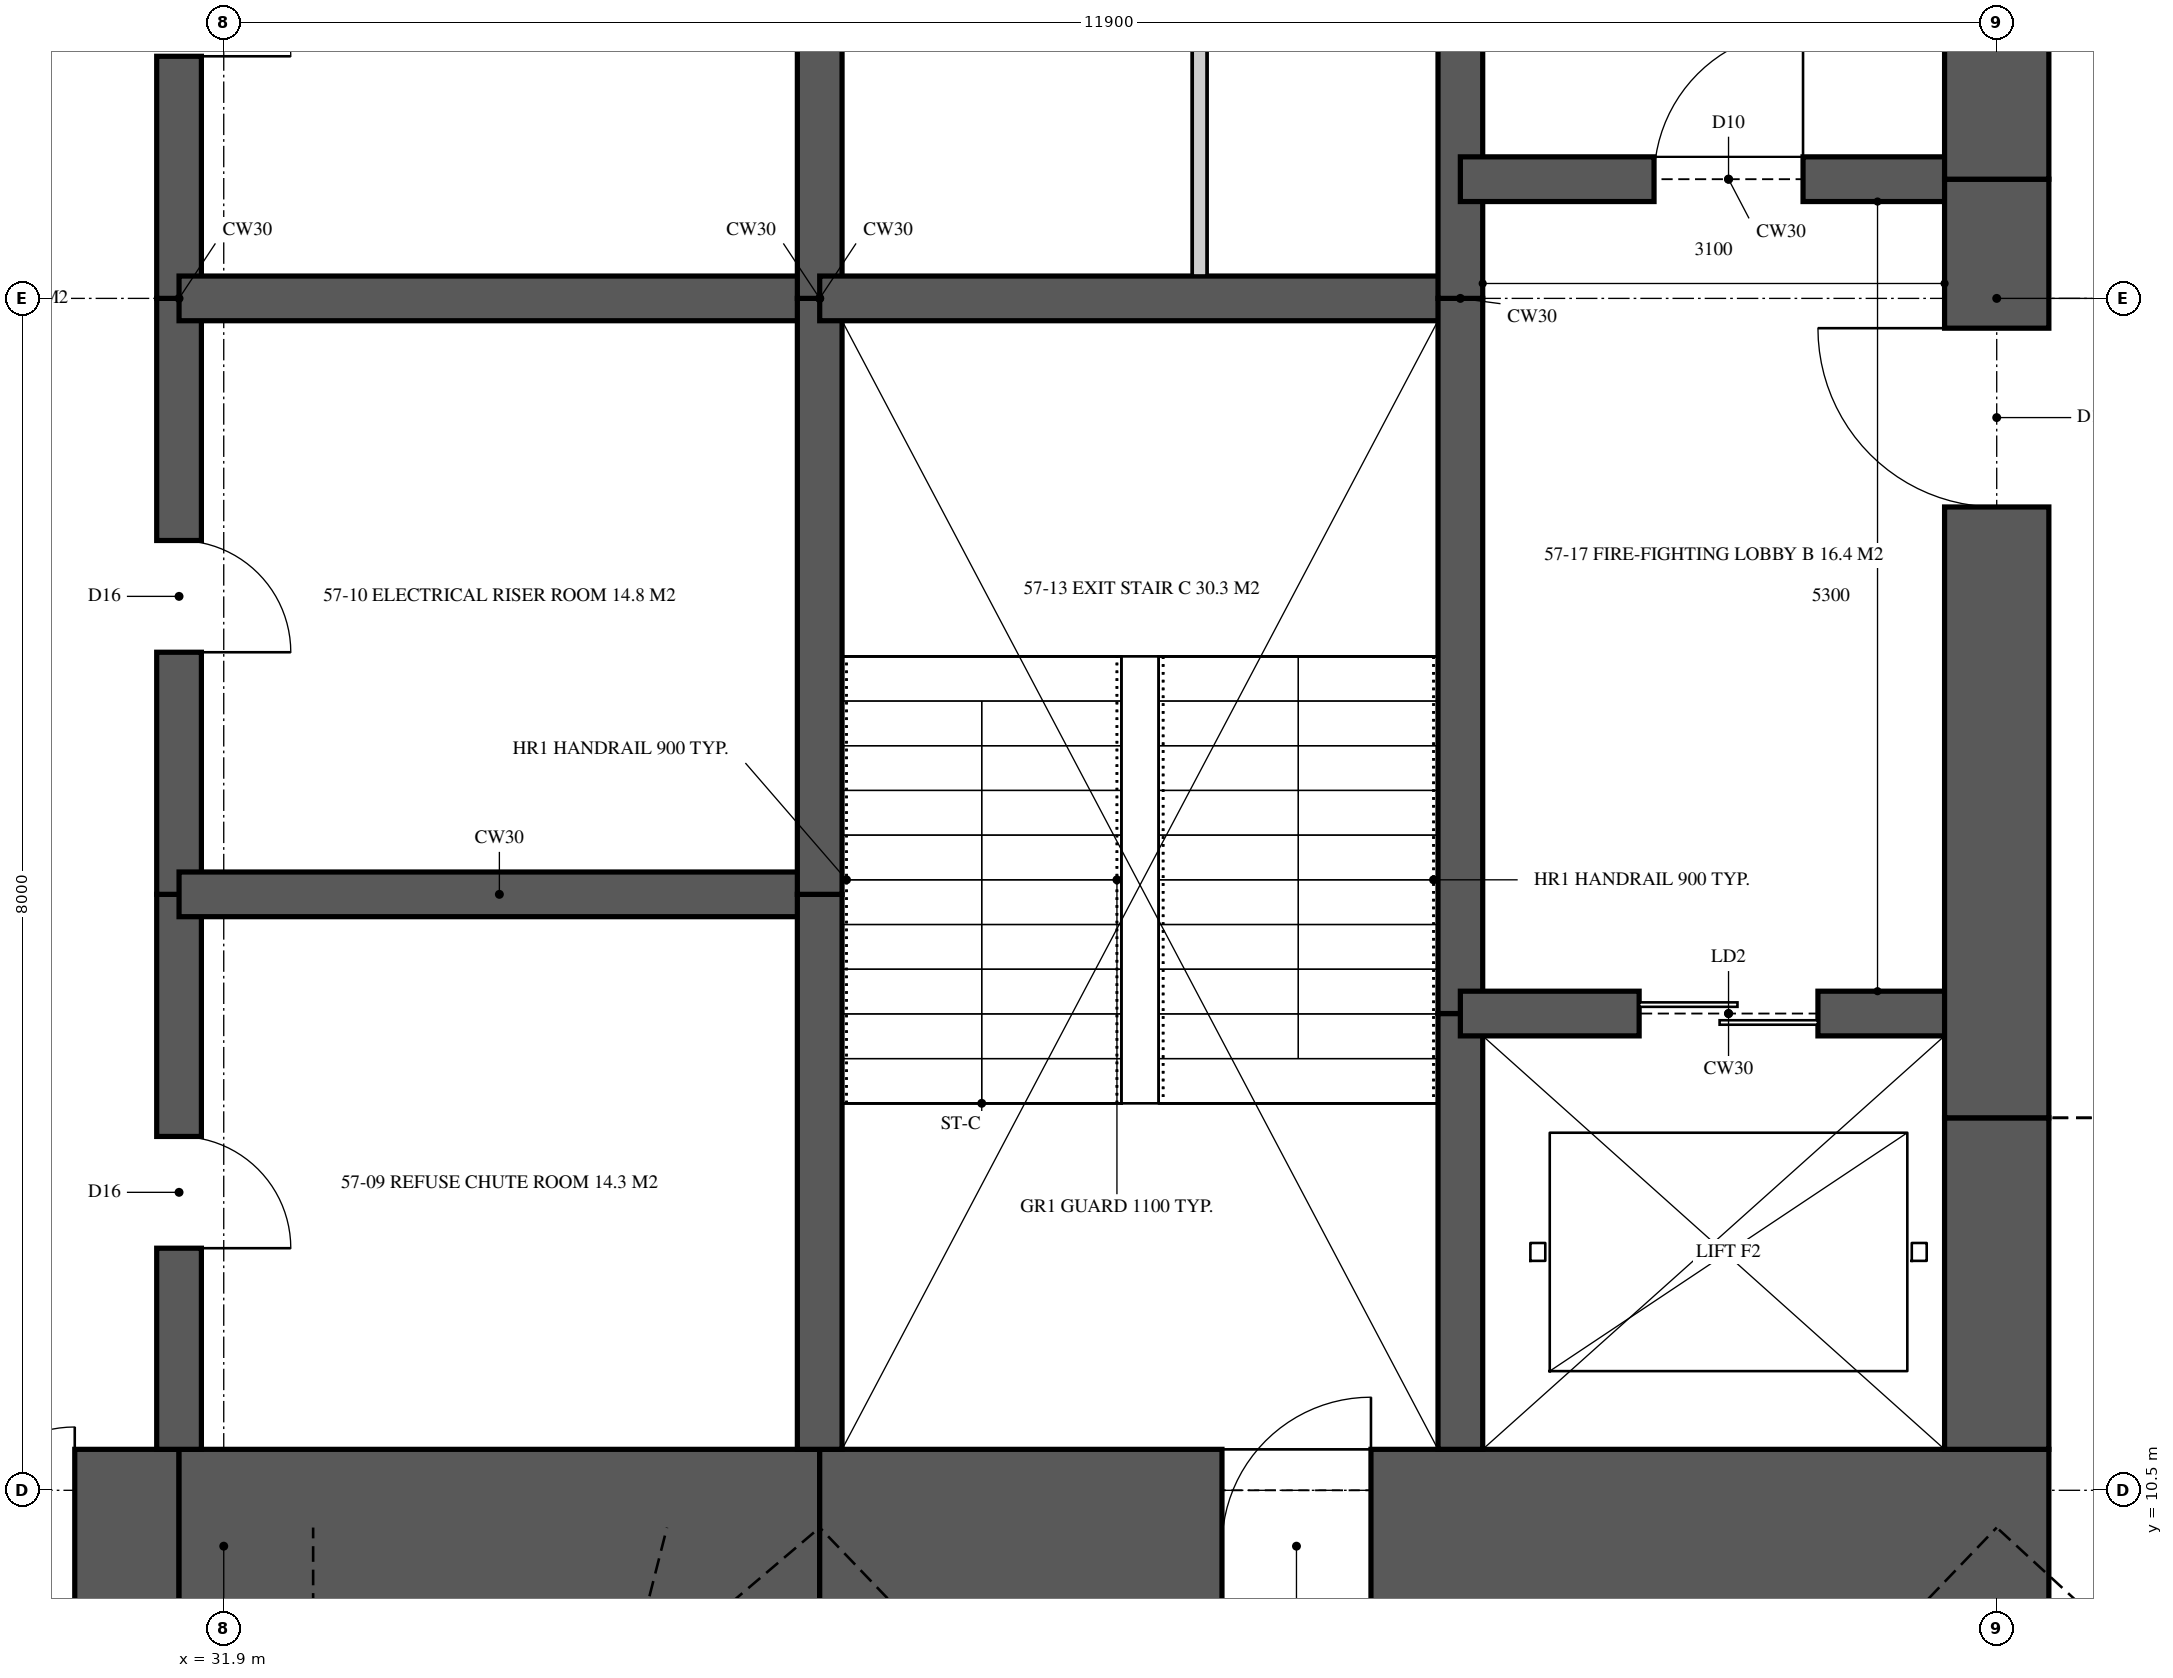
"""IFC4 building model, lengths in metres.
Left out: names, types, materials, properties, quantities, classifications, styles, units other than length and angle.
Written with IfcOpenShell. Run it as: python <this file> out.ifc"""

import sys

from ifc_helpers import new_model, si_unit, direction, frame, frame_2d, origin, place, context, subcontext, project, spatial, rectangle, extrude, element, fill, save


model = new_model("IFC4")
c1 = context("Model", 3, precision=1e-05, world=origin(), true_north=direction((0.0, 1.0)))
c2 = subcontext(c1, "Body", "Model", "MODEL_VIEW")
j1 = project(units=[si_unit("LENGTHUNIT", "METRE"), si_unit("PLANEANGLEUNIT", "RADIAN")], contexts=[c1])
p1 = place(None, origin())
s1 = spatial("IfcSite", under=j1, at=p1, CompositionType="ELEMENT")
p2 = place(p1, origin())
s2 = spatial("IfcBuilding", under=s1, at=p2, CompositionType="ELEMENT")
p3 = place(p2, frame((0.0, 0.0, 207.95)))
s3 = spatial("IfcBuildingStorey", under=s2, at=p3, CompositionType="ELEMENT", Elevation=207.95)
p4 = place(p3, frame((26.0, 10.125, 0.0), z_axis=(0.0, 0.0, 1.0), x_axis=(1.0, 0.0, 0.0)))
e1 = element("IfcWall", 1, at=p4, inside=s3, PredefinedType="SHEAR", context=c2, shape_type="SweptSolid", body=[
    extrude(rectangle(XDim=5.6, YDim=1.3, at=frame_2d((2.8, 0.0))), origin(), (0.0, 0.0, 1.0), 5.0),
])
p5 = place(p4, frame((3.3, 0.0, 0.0)))
e2 = element("IfcOpeningElement", 2, at=p5, cuts=e1, PredefinedType="OPENING", context=c2, shape_type="SweptSolid", body=[
    extrude(rectangle(XDim=1.6, YDim=2.1, at=frame_2d((0.8, 1.05))), frame((0.0, 0.66, 0.0), z_axis=(0.0, -1.0, 0.0), x_axis=(1.0, 0.0, 0.0)), (0.0, 0.0, 1.0), 1.32),
])
p6 = place(p3, frame((31.6, 10.125, 0.0), z_axis=(0.0, 0.0, 1.0), x_axis=(1.0, 0.0, 0.0)))
e3 = element("IfcWall", 3, at=p6, inside=s3, PredefinedType="SHEAR", context=c2, shape_type="SweptSolid", body=[
    extrude(rectangle(XDim=4.3, YDim=1.3, at=frame_2d((2.15, 0.0))), origin(), (0.0, 0.0, 1.0), 5.0),
])
p7 = place(p3, frame((35.9, 10.125, 0.0), z_axis=(0.0, 0.0, 1.0), x_axis=(1.0, 0.0, 0.0)))
e4 = element("IfcWall", 4, at=p7, inside=s3, PredefinedType="SHEAR", context=c2, shape_type="SweptSolid", body=[
    extrude(rectangle(XDim=8.25, YDim=1.3, at=frame_2d((4.125, 0.0))), origin(), (0.0, 0.0, 1.0), 5.0),
])
p8 = place(p7, frame((2.7, 0.0, 0.0)))
e5 = element("IfcOpeningElement", 5, at=p8, cuts=e4, PredefinedType="OPENING", context=c2, shape_type="SweptSolid", body=[
    extrude(rectangle(XDim=1.0, YDim=2.1, at=frame_2d((0.5, 1.05))), frame((0.0, 0.66, 0.0), z_axis=(0.0, -1.0, 0.0), x_axis=(1.0, 0.0, 0.0)), (0.0, 0.0, 1.0), 1.32),
])
p9 = place(p3, frame((43.8, 10.775, 0.0), z_axis=(0.0, 0.0, 1.0), x_axis=(0.0, 1.0, 0.0)))
e6 = element("IfcWall", 6, at=p9, inside=s3, PredefinedType="SHEAR", context=c2, shape_type="SweptSolid", body=[
    extrude(rectangle(XDim=2.225, YDim=0.7, at=frame_2d((1.113, 0.0))), origin(), (0.0, 0.0, 1.0), 5.0),
])
p10 = place(p3, frame((43.8, 13.0, 0.0), z_axis=(0.0, 0.0, 1.0), x_axis=(0.0, 1.0, 0.0)))
e7 = element("IfcWall", 7, at=p10, inside=s3, PredefinedType="SHEAR", context=c2, shape_type="SweptSolid", body=[
    extrude(rectangle(XDim=6.3, YDim=0.7, at=frame_2d((3.15, 0.0))), origin(), (0.0, 0.0, 1.0), 5.0),
])
p11 = place(p10, frame((4.1, 0.0, 0.0)))
e8 = element("IfcOpeningElement", 8, at=p11, cuts=e7, PredefinedType="OPENING", context=c2, shape_type="SweptSolid", body=[
    extrude(rectangle(XDim=1.2, YDim=2.2, at=frame_2d((0.6, 1.1))), frame((0.0, 0.36, 0.0), z_axis=(0.0, -1.0, 0.0), x_axis=(1.0, 0.0, 0.0)), (0.0, 0.0, 1.0), 0.72),
])
p12 = place(p3, frame((43.8, 19.3, 0.0), z_axis=(0.0, 0.0, 1.0), x_axis=(0.0, 1.0, 0.0)))
e9 = element("IfcWall", 9, at=p12, inside=s3, PredefinedType="SHEAR", context=c2, shape_type="SweptSolid", body=[
    extrude(rectangle(XDim=6.925, YDim=0.7, at=frame_2d((3.462, 0.0))), origin(), (0.0, 0.0, 1.0), 5.0),
])
p13 = place(p3, frame((31.6, 10.775, 0.0), z_axis=(0.0, 0.0, 1.0), x_axis=(0.0, 1.0, 0.0)))
e10 = element("IfcWall", 10, at=p13, inside=s3, PredefinedType="SHEAR", context=c2, shape_type="SweptSolid", body=[
    extrude(rectangle(XDim=3.725, YDim=0.3, at=frame_2d((1.863, 0.0))), origin(), (0.0, 0.0, 1.0), 5.0),
])
p14 = place(p13, frame((1.35, 0.0, 0.0)))
e11 = element("IfcOpeningElement", 11, at=p14, cuts=e10, PredefinedType="OPENING", context=c2, shape_type="SweptSolid", body=[
    extrude(rectangle(XDim=0.75, YDim=2.1, at=frame_2d((0.375, 1.05))), frame((0.0, 0.16, 0.0), z_axis=(0.0, -1.0, 0.0), x_axis=(1.0, 0.0, 0.0)), (0.0, 0.0, 1.0), 0.32),
])
p15 = place(p3, frame((31.6, 14.5, 0.0), z_axis=(0.0, 0.0, 1.0), x_axis=(0.0, 1.0, 0.0)))
e12 = element("IfcWall", 12, at=p15, inside=s3, PredefinedType="SHEAR", context=c2, shape_type="SweptSolid", body=[
    extrude(rectangle(XDim=4.0, YDim=0.3, at=frame_2d((2.0, 0.0))), origin(), (0.0, 0.0, 1.0), 5.0),
])
p16 = place(p15, frame((1.625, 0.0, 0.0)))
e13 = element("IfcOpeningElement", 13, at=p16, cuts=e12, PredefinedType="OPENING", context=c2, shape_type="SweptSolid", body=[
    extrude(rectangle(XDim=0.75, YDim=2.1, at=frame_2d((0.375, 1.05))), frame((0.0, 0.16, 0.0), z_axis=(0.0, -1.0, 0.0), x_axis=(1.0, 0.0, 0.0)), (0.0, 0.0, 1.0), 0.32),
])
p17 = place(p3, frame((31.6, 18.5, 0.0), z_axis=(0.0, 0.0, 1.0), x_axis=(0.0, 1.0, 0.0)))
e14 = element("IfcWall", 14, at=p17, inside=s3, PredefinedType="SHEAR", context=c2, shape_type="SweptSolid", body=[
    extrude(rectangle(XDim=4.0, YDim=0.3, at=frame_2d((2.0, 0.0))), origin(), (0.0, 0.0, 1.0), 5.0),
])
p18 = place(p17, frame((1.625, 0.0, 0.0)))
e15 = element("IfcOpeningElement", 15, at=p18, cuts=e14, PredefinedType="OPENING", context=c2, shape_type="SweptSolid", body=[
    extrude(rectangle(XDim=0.75, YDim=2.1, at=frame_2d((0.375, 1.05))), frame((0.0, 0.16, 0.0), z_axis=(0.0, -1.0, 0.0), x_axis=(1.0, 0.0, 0.0)), (0.0, 0.0, 1.0), 0.32),
])
p19 = place(p3, frame((35.9, 10.775, 0.0), z_axis=(0.0, 0.0, 1.0), x_axis=(0.0, 1.0, 0.0)))
e16 = element("IfcWall", 16, at=p19, inside=s3, PredefinedType="SHEAR", context=c2, shape_type="SweptSolid", body=[
    extrude(rectangle(XDim=3.725, YDim=0.3, at=frame_2d((1.863, 0.0))), origin(), (0.0, 0.0, 1.0), 5.0),
])
for number, where, z_axis, x_axis in (
    (17, (35.9, 14.5, 0.0), (0.0, 0.0, 1.0), (0.0, 1.0, 0.0)),
    (18, (35.9, 18.5, 0.0), (0.0, 0.0, 1.0), (0.0, 1.0, 0.0)),
):
    element("IfcWall", number, at=place(p3, frame(where, z_axis=z_axis, x_axis=x_axis)), inside=s3, PredefinedType="SHEAR", context=c2, shape_type="SweptSolid", body=[
        extrude(rectangle(XDim=4.0, YDim=0.3, at=frame_2d((2.0, 0.0))), origin(), (0.0, 0.0, 1.0), 5.0),
    ])
p20 = place(p3, frame((40.2, 10.775, 0.0), z_axis=(0.0, 0.0, 1.0), x_axis=(0.0, 1.0, 0.0)))
e19 = element("IfcWall", 19, at=p20, inside=s3, PredefinedType="SHEAR", context=c2, shape_type="SweptSolid", body=[
    extrude(rectangle(XDim=2.925, YDim=0.3, at=frame_2d((1.462, 0.0))), origin(), (0.0, 0.0, 1.0), 5.0),
])
p21 = place(p3, frame((40.2, 13.7, 0.0), z_axis=(0.0, 0.0, 1.0), x_axis=(0.0, 1.0, 0.0)))
e20 = element("IfcWall", 20, at=p21, inside=s3, PredefinedType="SHEAR", context=c2, shape_type="SweptSolid", body=[
    extrude(rectangle(XDim=4.8, YDim=0.3, at=frame_2d((2.4, 0.0))), origin(), (0.0, 0.0, 1.0), 5.0),
])
p22 = place(p3, frame((40.2, 18.5, 0.0), z_axis=(0.0, 0.0, 1.0), x_axis=(0.0, 1.0, 0.0)))
e21 = element("IfcWall", 21, at=p22, inside=s3, PredefinedType="SHEAR", context=c2, shape_type="SweptSolid", body=[
    extrude(rectangle(XDim=7.725, YDim=0.3, at=frame_2d((3.863, 0.0))), origin(), (0.0, 0.0, 1.0), 5.0),
])
for number, where, z_axis, x_axis in (
    (22, (31.6, 14.5, 0.0), (0.0, 0.0, 1.0), (1.0, 0.0, 0.0)),
    (23, (31.6, 18.5, 0.0), (0.0, 0.0, 1.0), (1.0, 0.0, 0.0)),
):
    element("IfcWall", number, at=place(p3, frame(where, z_axis=z_axis, x_axis=x_axis)), inside=s3, PredefinedType="SHEAR", context=c2, shape_type="SweptSolid", body=[
        extrude(rectangle(XDim=4.3, YDim=0.3, at=frame_2d((2.15, 0.0))), origin(), (0.0, 0.0, 1.0), 5.0),
    ])
p23 = place(p3, frame((35.9, 18.5, 0.0), z_axis=(0.0, 0.0, 1.0), x_axis=(1.0, 0.0, 0.0)))
e24 = element("IfcWall", 24, at=p23, inside=s3, PredefinedType="SHEAR", context=c2, shape_type="SweptSolid", body=[
    extrude(rectangle(XDim=4.3, YDim=0.3, at=frame_2d((2.15, 0.0))), origin(), (0.0, 0.0, 1.0), 5.0),
])
p24 = place(p3, frame((40.2, 13.7, 0.0), z_axis=(0.0, 0.0, 1.0), x_axis=(1.0, 0.0, 0.0)))
e25 = element("IfcWall", 25, at=p24, inside=s3, PredefinedType="SHEAR", context=c2, shape_type="SweptSolid", body=[
    extrude(rectangle(XDim=3.6, YDim=0.3, at=frame_2d((1.8, 0.0))), origin(), (0.0, 0.0, 1.0), 5.0),
])
p25 = place(p24, frame((1.2, 0.0, 0.0)))
e26 = element("IfcOpeningElement", 26, at=p25, cuts=e25, PredefinedType="OPENING", context=c2, shape_type="SweptSolid", body=[
    extrude(rectangle(XDim=1.2, YDim=2.1, at=frame_2d((0.6, 1.05))), frame((0.0, 0.16, 0.0), z_axis=(0.0, -1.0, 0.0), x_axis=(1.0, 0.0, 0.0)), (0.0, 0.0, 1.0), 0.32),
])
p26 = place(p3, frame((40.2, 19.3, 0.0), z_axis=(0.0, 0.0, 1.0), x_axis=(1.0, 0.0, 0.0)))
e27 = element("IfcWall", 27, at=p26, inside=s3, PredefinedType="SHEAR", context=c2, shape_type="SweptSolid", body=[
    extrude(rectangle(XDim=3.6, YDim=0.3, at=frame_2d((1.8, 0.0))), origin(), (0.0, 0.0, 1.0), 5.0),
])
p27 = place(p26, frame((1.3, 0.0, 0.0)))
e28 = element("IfcOpeningElement", 28, at=p27, cuts=e27, PredefinedType="OPENING", context=c2, shape_type="SweptSolid", body=[
    extrude(rectangle(XDim=1.0, YDim=2.1, at=frame_2d((0.5, 1.05))), frame((0.0, 0.16, 0.0), z_axis=(0.0, -1.0, 0.0), x_axis=(1.0, 0.0, 0.0)), (0.0, 0.0, 1.0), 0.32),
])
p28 = place(p3, frame((38.45, 18.65, 0.0), z_axis=(0.0, 0.0, 1.0), x_axis=(0.0, 1.0, 0.0)))
e29 = element("IfcWall", 29, at=p28, inside=s3, PredefinedType="PARTITIONING", context=c2, shape_type="SweptSolid", body=[
    extrude(rectangle(XDim=5.725, YDim=0.1, at=frame_2d((2.863, 0.0))), origin(), (0.0, 0.0, 1.0), 4.72),
])
p29 = place(p27, origin())
e30 = element("IfcDoor", 30, at=p29, inside=s3, OperationType="SINGLE_SWING_RIGHT", PredefinedType="DOOR", context=c2, shape_type="SweptSolid", body=[
    extrude(rectangle(XDim=1.0, YDim=2.1, at=frame_2d((0.5, 1.05))), frame((0.0, 0.025, 0.0), z_axis=(0.0, -1.0, 0.0), x_axis=(1.0, 0.0, 0.0)), (0.0, 0.0, 1.0), 0.05),
])
fill(e28, e30)
p30 = place(p11, origin())
e31 = element("IfcDoor", 31, at=p30, inside=s3, OperationType="SINGLE_SWING_RIGHT", PredefinedType="DOOR", context=c2, shape_type="SweptSolid", body=[
    extrude(rectangle(XDim=1.2, YDim=2.2, at=frame_2d((0.6, 1.1))), frame((0.0, 0.025, 0.0), z_axis=(0.0, -1.0, 0.0), x_axis=(1.0, 0.0, 0.0)), (0.0, 0.0, 1.0), 0.05),
])
fill(e8, e31)
p31 = place(p25, origin())
e32 = element("IfcDoor", 32, at=p31, inside=s3, OperationType="SLIDING_TO_LEFT", PredefinedType="DOOR", context=c2, shape_type="SweptSolid", body=[
    extrude(rectangle(XDim=1.2, YDim=2.1, at=frame_2d((0.6, 1.05))), frame((0.0, 0.025, 0.0), z_axis=(0.0, -1.0, 0.0), x_axis=(1.0, 0.0, 0.0)), (0.0, 0.0, 1.0), 0.05),
])
fill(e26, e32)
p32 = place(p5, origin())
e33 = element("IfcDoor", 33, at=p32, inside=s3, OperationType="DOUBLE_DOOR_SINGLE_SWING", PredefinedType="DOOR", context=c2, shape_type="SweptSolid", body=[
    extrude(rectangle(XDim=1.6, YDim=2.1, at=frame_2d((0.8, 1.05))), frame((0.0, 0.025, 0.0), z_axis=(0.0, -1.0, 0.0), x_axis=(1.0, 0.0, 0.0)), (0.0, 0.0, 1.0), 0.05),
])
fill(e2, e33)
p33 = place(p14, frame((0.75, 0.0, 0.0), z_axis=(0.0, 0.0, 1.0), x_axis=(-1.0, 0.0, 0.0)))
e34 = element("IfcDoor", 34, at=p33, inside=s3, OperationType="SINGLE_SWING_RIGHT", PredefinedType="DOOR", context=c2, shape_type="SweptSolid", body=[
    extrude(rectangle(XDim=0.75, YDim=2.1, at=frame_2d((0.375, 1.05))), frame((0.0, 0.025, 0.0), z_axis=(0.0, -1.0, 0.0), x_axis=(1.0, 0.0, 0.0)), (0.0, 0.0, 1.0), 0.05),
])
fill(e11, e34)
p34 = place(p16, frame((0.75, 0.0, 0.0), z_axis=(0.0, 0.0, 1.0), x_axis=(-1.0, 0.0, 0.0)))
e35 = element("IfcDoor", 35, at=p34, inside=s3, OperationType="SINGLE_SWING_RIGHT", PredefinedType="DOOR", context=c2, shape_type="SweptSolid", body=[
    extrude(rectangle(XDim=0.75, YDim=2.1, at=frame_2d((0.375, 1.05))), frame((0.0, 0.025, 0.0), z_axis=(0.0, -1.0, 0.0), x_axis=(1.0, 0.0, 0.0)), (0.0, 0.0, 1.0), 0.05),
])
fill(e13, e35)
p35 = place(p18, frame((0.75, 0.0, 0.0), z_axis=(0.0, 0.0, 1.0), x_axis=(-1.0, 0.0, 0.0)))
e36 = element("IfcDoor", 36, at=p35, inside=s3, OperationType="SINGLE_SWING_RIGHT", PredefinedType="DOOR", context=c2, shape_type="SweptSolid", body=[
    extrude(rectangle(XDim=0.75, YDim=2.1, at=frame_2d((0.375, 1.05))), frame((0.0, 0.025, 0.0), z_axis=(0.0, -1.0, 0.0), x_axis=(1.0, 0.0, 0.0)), (0.0, 0.0, 1.0), 0.05),
])
fill(e15, e36)
p36 = place(p8, origin())
e37 = element("IfcDoor", 37, at=p36, inside=s3, OperationType="SINGLE_SWING_RIGHT", PredefinedType="DOOR", context=c2, shape_type="SweptSolid", body=[
    extrude(rectangle(XDim=1.0, YDim=2.1, at=frame_2d((0.5, 1.05))), frame((0.0, 0.025, 0.0), z_axis=(0.0, -1.0, 0.0), x_axis=(1.0, 0.0, 0.0)), (0.0, 0.0, 1.0), 0.05),
])
fill(e5, e37)
save(model, sys.argv[1])
